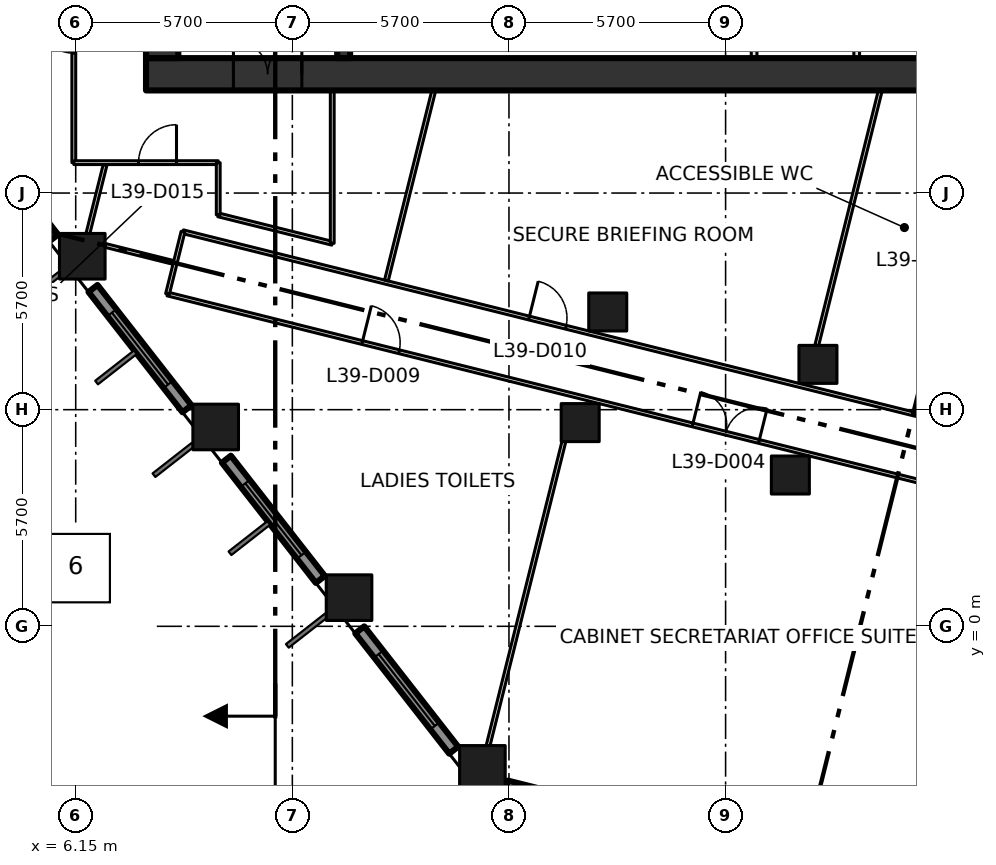
"""IFC4 building model, lengths in metres.
Left out: names, types, materials, properties, quantities, classifications, styles, units other than length and angle.
Written with IfcOpenShell. Run it as: python <this file> out.ifc"""

import sys

from ifc_helpers import new_model, si_unit, direction, frame, frame_2d, origin, origin_2d, place, context, subcontext, project, spatial, rectangle, extrude, element, fill, save


model = new_model("IFC4")
c1 = context("Model", 3, precision=1e-05, world=origin(), true_north=direction((0.0, 1.0)))
c2 = subcontext(c1, "Body", "Model", "MODEL_VIEW")
j1 = project(units=[si_unit("LENGTHUNIT", "METRE"), si_unit("PLANEANGLEUNIT", "RADIAN")], contexts=[c1])
p1 = place(None, origin())
s1 = spatial("IfcSite", under=j1, at=p1, CompositionType="ELEMENT")
p2 = place(p1, origin())
s2 = spatial("IfcBuilding", under=s1, at=p2, CompositionType="ELEMENT")
p3 = place(p2, frame((0.0, 0.0, 174.0)))
s3 = spatial("IfcBuildingStorey", under=s2, at=p3, CompositionType="ELEMENT", Elevation=174.0)
for number, where, z_axis, x_axis in (
    (1, (16.851, -3.738, 0.0), (0.0, 0.0, 1.0), (1.0, 0.0, 0.0)),
    (2, (13.342, 0.754, 0.0), (0.0, 0.0, 1.0), (1.0, 0.0, 0.0)),
    (3, (9.833, 5.245, 0.0), (0.0, 0.0, 1.0), (1.0, 0.0, 0.0)),
    (4, (6.323, 9.737, 0.0), (0.0, 0.0, 1.0), (1.0, 0.0, 0.0)),
):
    element("IfcColumn", number, at=place(p3, frame(where, z_axis=z_axis, x_axis=x_axis)), inside=s3, PredefinedType="COLUMN", context=c2, shape_type="SweptSolid", body=[
        extrude(rectangle(XDim=1.2, YDim=1.2, at=origin_2d()), origin(), (0.0, 0.0, 1.0), 4.2),
    ])
for number, where, z_axis, x_axis in (
    (5, (19.424, 5.36, 0.0), (0.0, 0.0, 1.0), (1.0, 0.0, 0.0)),
    (6, (24.954, 3.981, 0.0), (0.0, 0.0, 1.0), (1.0, 0.0, 0.0)),
    (7, (20.149, 8.271, 0.0), (0.0, 0.0, 1.0), (1.0, 0.0, 0.0)),
    (8, (25.68, 6.892, 0.0), (0.0, 0.0, 1.0), (1.0, 0.0, 0.0)),
):
    element("IfcColumn", number, at=place(p3, frame(where, z_axis=z_axis, x_axis=x_axis)), inside=s3, PredefinedType="COLUMN", context=c2, shape_type="SweptSolid", body=[
        extrude(rectangle(XDim=1.0, YDim=1.0, at=origin_2d()), origin(), (0.0, 0.0, 1.0), 4.2),
    ])
p4 = place(p3, frame((8.0, 14.525, -0.3), z_axis=(0.0, 0.0, 1.0), x_axis=(1.0, 0.0, 0.0)))
e9 = element("IfcWall", 9, at=p4, inside=s3, PredefinedType="SHEAR", context=c2, shape_type="SweptSolid", body=[
    extrude(rectangle(XDim=22.8, YDim=0.85, at=frame_2d((11.4, 0.0))), origin(), (0.0, 0.0, 1.0), 4.2),
])
p5 = place(p4, frame((2.3, 0.0, 0.3)))
e10 = element("IfcOpeningElement", 10, at=p5, cuts=e9, PredefinedType="OPENING", context=c2, shape_type="SweptSolid", body=[
    extrude(rectangle(XDim=1.8, YDim=2.1, at=frame_2d((0.9, 1.05))), frame((0.0, 0.435, 0.0), z_axis=(0.0, -1.0, 0.0), x_axis=(1.0, 0.0, 0.0)), (0.0, 0.0, 1.0), 0.87),
])
p6 = place(p3, frame((8.425, 14.95, -0.3), z_axis=(0.0, 0.0, 1.0), x_axis=(0.0, 1.0, 0.0)))
e11 = element("IfcWall", 11, at=p6, inside=s3, PredefinedType="SHEAR", context=c2, shape_type="SweptSolid", body=[
    extrude(rectangle(XDim=20.75, YDim=0.85, at=frame_2d((10.375, 0.0))), origin(), (0.0, 0.0, 1.0), 4.2),
])
p7 = place(p3, frame((13.2, 14.95, 0.0), z_axis=(0.0, 0.0, 1.0), x_axis=(0.0, 1.0, 0.0)))
e12 = element("IfcWall", 12, at=p7, inside=s3, PredefinedType="SHEAR", context=c2, shape_type="SweptSolid", body=[
    extrude(rectangle(XDim=20.75, YDim=0.34, at=frame_2d((10.375, 0.0))), origin(), (0.0, 0.0, 1.0), 3.9),
])
p8 = place(p7, frame((3.35, 0.0, 0.0)))
e13 = element("IfcOpeningElement", 13, at=p8, cuts=e12, PredefinedType="OPENING", context=c2, shape_type="SweptSolid", body=[
    extrude(rectangle(XDim=1.8, YDim=2.1, at=frame_2d((0.9, 1.05))), frame((0.0, 0.18, 0.0), z_axis=(0.0, -1.0, 0.0), x_axis=(1.0, 0.0, 0.0)), (0.0, 0.0, 1.0), 0.36),
])
p9 = place(p7, frame((11.45, 0.0, 0.0)))
e14 = element("IfcOpeningElement", 14, at=p9, cuts=e12, PredefinedType="OPENING", context=c2, shape_type="SweptSolid", body=[
    extrude(rectangle(XDim=1.2, YDim=2.1, at=frame_2d((0.6, 1.05))), frame((0.0, 0.18, 0.0), z_axis=(0.0, -1.0, 0.0), x_axis=(1.0, 0.0, 0.0)), (0.0, 0.0, 1.0), 0.36),
])
for number, where, z_axis, x_axis in (
    (15, (24.0, 14.95, 0.0), (0.0, 0.0, 1.0), (0.0, 1.0, 0.0)),
    (16, (26.7, 14.95, 0.0), (0.0, 0.0, 1.0), (0.0, 1.0, 0.0)),
):
    element("IfcWall", number, at=place(p3, frame(where, z_axis=z_axis, x_axis=x_axis)), inside=s3, PredefinedType="PARTITIONING", context=c2, shape_type="SweptSolid", body=[
        extrude(rectangle(XDim=2.675, YDim=0.15, at=frame_2d((1.337, 0.0))), origin(), (0.0, 0.0, 1.0), 3.9),
    ])
p10 = place(p3, frame((3.096, 13.381, 0.0), z_axis=(0.0, 0.0, 1.0), x_axis=(0.615563820493, -0.78808704018, 0.0)))
e17 = element("IfcWall", 17, at=p10, inside=s3, PredefinedType="SOLIDWALL", context=c2, shape_type="SweptSolid", body=[
    extrude(rectangle(XDim=4.016, YDim=0.3, at=frame_2d((2.008, 0.0))), origin(), (0.0, 0.0, 1.0), 3.15),
])
p11 = place(p10, frame((0.808, 0.0, 0.8)))
e18 = element("IfcOpeningElement", 18, at=p11, cuts=e17, PredefinedType="OPENING", context=c2, shape_type="SweptSolid", body=[
    extrude(rectangle(XDim=2.4, YDim=2.1, at=frame_2d((1.2, 1.05))), frame((0.0, 0.16, 0.0), z_axis=(0.0, -1.0, 0.0), x_axis=(1.0, 0.0, 0.0)), (0.0, 0.0, 1.0), 0.32),
])
p12 = place(p3, frame((6.605, 8.889, 0.0), z_axis=(0.0, 0.0, 1.0), x_axis=(0.615706559089, -0.787975528233, 0.0)))
e19 = element("IfcWall", 19, at=p12, inside=s3, PredefinedType="SOLIDWALL", context=c2, shape_type="SweptSolid", body=[
    extrude(rectangle(XDim=4.016, YDim=0.3, at=frame_2d((2.008, 0.0))), origin(), (0.0, 0.0, 1.0), 3.15),
])
p13 = place(p12, frame((0.808, 0.0, 0.8)))
e20 = element("IfcOpeningElement", 20, at=p13, cuts=e19, PredefinedType="OPENING", context=c2, shape_type="SweptSolid", body=[
    extrude(rectangle(XDim=2.4, YDim=2.1, at=frame_2d((1.2, 1.05))), frame((0.0, 0.16, 0.0), z_axis=(0.0, -1.0, 0.0), x_axis=(1.0, 0.0, 0.0)), (0.0, 0.0, 1.0), 0.32),
])
p14 = place(p3, frame((10.115, 4.397, 0.0), z_axis=(0.0, 0.0, 1.0), x_axis=(0.615644041972, -0.788024373725, 0.0)))
e21 = element("IfcWall", 21, at=p14, inside=s3, PredefinedType="SOLIDWALL", context=c2, shape_type="SweptSolid", body=[
    extrude(rectangle(XDim=4.015, YDim=0.3, at=frame_2d((2.008, 0.0))), origin(), (0.0, 0.0, 1.0), 3.15),
])
p15 = place(p14, frame((0.807, 0.0, 0.8)))
e22 = element("IfcOpeningElement", 22, at=p15, cuts=e21, PredefinedType="OPENING", context=c2, shape_type="SweptSolid", body=[
    extrude(rectangle(XDim=2.4, YDim=2.1, at=frame_2d((1.2, 1.05))), frame((0.0, 0.16, 0.0), z_axis=(0.0, -1.0, 0.0), x_axis=(1.0, 0.0, 0.0)), (0.0, 0.0, 1.0), 0.32),
])
p16 = place(p3, frame((13.624, -0.094, 0.0), z_axis=(0.0, 0.0, 1.0), x_axis=(0.615526062586, -0.7881165309, 0.0)))
e23 = element("IfcWall", 23, at=p16, inside=s3, PredefinedType="SOLIDWALL", context=c2, shape_type="SweptSolid", body=[
    extrude(rectangle(XDim=4.016, YDim=0.3, at=frame_2d((2.008, 0.0))), origin(), (0.0, 0.0, 1.0), 3.15),
])
p17 = place(p16, frame((0.808, 0.0, 0.8)))
e24 = element("IfcOpeningElement", 24, at=p17, cuts=e23, PredefinedType="OPENING", context=c2, shape_type="SweptSolid", body=[
    extrude(rectangle(XDim=2.4, YDim=2.1, at=frame_2d((1.2, 1.05))), frame((0.0, 0.16, 0.0), z_axis=(0.0, -1.0, 0.0), x_axis=(1.0, 0.0, 0.0)), (0.0, 0.0, 1.0), 0.32),
])
p18 = place(p3, frame((17.484, -4.205, 0.0), z_axis=(0.0, 0.0, 1.0), x_axis=(0.970318118028, -0.241832069473, 0.0)))
e25 = element("IfcWall", 25, at=p18, inside=s3, PredefinedType="SOLIDWALL", context=c2, shape_type="SweptSolid", body=[
    extrude(rectangle(XDim=4.246, YDim=0.3, at=frame_2d((2.123, 0.0))), origin(), (0.0, 0.0, 1.0), 3.15),
])
p19 = place(p18, frame((0.923, 0.0, 0.8)))
e26 = element("IfcOpeningElement", 26, at=p19, cuts=e25, PredefinedType="OPENING", context=c2, shape_type="SweptSolid", body=[
    extrude(rectangle(XDim=2.4, YDim=2.1, at=frame_2d((1.2, 1.05))), frame((0.0, 0.16, 0.0), z_axis=(0.0, -1.0, 0.0), x_axis=(1.0, 0.0, 0.0)), (0.0, 0.0, 1.0), 0.32),
])
p20 = place(p3, frame((6.1, 12.2, 0.0), z_axis=(0.0, 0.0, 1.0), x_axis=(0.0, 1.0, 0.0)))
e27 = element("IfcWall", 27, at=p20, inside=s3, PredefinedType="PARTITIONING", context=c2, shape_type="SweptSolid", body=[
    extrude(rectangle(XDim=26.7, YDim=0.1, at=frame_2d((13.35, 0.0))), origin(), (0.0, 0.0, 1.0), 3.9),
])
p21 = place(p20, frame((2.88, 0.0, 0.0)))
e28 = element("IfcOpeningElement", 28, at=p21, cuts=e27, PredefinedType="OPENING", context=c2, shape_type="SweptSolid", body=[
    extrude(rectangle(XDim=1.0, YDim=2.1, at=frame_2d((0.5, 1.05))), frame((0.0, 0.06, 0.0), z_axis=(0.0, -1.0, 0.0), x_axis=(1.0, 0.0, 0.0)), (0.0, 0.0, 1.0), 0.12),
])
p22 = place(p20, frame((11.578, 0.0, 0.0)))
e29 = element("IfcOpeningElement", 29, at=p22, cuts=e27, PredefinedType="OPENING", context=c2, shape_type="SweptSolid", body=[
    extrude(rectangle(XDim=1.0, YDim=2.1, at=frame_2d((0.5, 1.05))), frame((0.0, 0.06, 0.0), z_axis=(0.0, -1.0, 0.0), x_axis=(1.0, 0.0, 0.0)), (0.0, 0.0, 1.0), 0.12),
])
p23 = place(p3, frame((6.1, 12.2, 0.0), z_axis=(0.0, 0.0, 1.0), x_axis=(1.0, 0.0, 0.0)))
e30 = element("IfcWall", 30, at=p23, inside=s3, PredefinedType="PARTITIONING", context=c2, shape_type="SweptSolid", body=[
    extrude(rectangle(XDim=3.8, YDim=0.1, at=frame_2d((1.9, 0.0))), origin(), (0.0, 0.0, 1.0), 3.9),
])
p24 = place(p23, frame((1.702, 0.0, 0.0)))
e31 = element("IfcOpeningElement", 31, at=p24, cuts=e30, PredefinedType="OPENING", context=c2, shape_type="SweptSolid", body=[
    extrude(rectangle(XDim=1.0, YDim=2.1, at=frame_2d((0.5, 1.05))), frame((0.0, 0.06, 0.0), z_axis=(0.0, -1.0, 0.0), x_axis=(1.0, 0.0, 0.0)), (0.0, 0.0, 1.0), 0.12),
])
p25 = place(p3, frame((8.565, 8.744, 0.0), z_axis=(0.0, 0.0, 1.0), x_axis=(0.97029693432, -0.24191705035, 0.0)))
e32 = element("IfcWall", 32, at=p25, inside=s3, PredefinedType="PARTITIONING", context=c2, shape_type="SweptSolid", body=[
    extrude(rectangle(XDim=56.375, YDim=0.1, at=frame_2d((28.187, 0.0))), origin(), (0.0, 0.0, 1.0), 3.9),
])
p26 = place(p25, frame((42.739, 0.0, 0.0)))
e33 = element("IfcOpeningElement", 33, at=p26, cuts=e32, PredefinedType="OPENING", context=c2, shape_type="SweptSolid", body=[
    extrude(rectangle(XDim=1.8, YDim=2.1, at=frame_2d((0.9, 1.05))), frame((0.0, 0.06, 0.0), z_axis=(0.0, -1.0, 0.0), x_axis=(1.0, 0.0, 0.0)), (0.0, 0.0, 1.0), 0.12),
])
p27 = place(p25, frame((14.239, 0.0, 0.0)))
e34 = element("IfcOpeningElement", 34, at=p27, cuts=e32, PredefinedType="OPENING", context=c2, shape_type="SweptSolid", body=[
    extrude(rectangle(XDim=1.8, YDim=2.1, at=frame_2d((0.9, 1.05))), frame((0.0, 0.06, 0.0), z_axis=(0.0, -1.0, 0.0), x_axis=(1.0, 0.0, 0.0)), (0.0, 0.0, 1.0), 0.12),
])
p28 = place(p25, frame((29.74, 0.0, 0.0)))
e35 = element("IfcOpeningElement", 35, at=p28, cuts=e32, PredefinedType="OPENING", context=c2, shape_type="SweptSolid", body=[
    extrude(rectangle(XDim=1.8, YDim=2.1, at=frame_2d((0.9, 1.05))), frame((0.0, 0.06, 0.0), z_axis=(0.0, -1.0, 0.0), x_axis=(1.0, 0.0, 0.0)), (0.0, 0.0, 1.0), 0.12),
])
p29 = place(p25, frame((35.64, 0.0, 0.0)))
e36 = element("IfcOpeningElement", 36, at=p29, cuts=e32, PredefinedType="OPENING", context=c2, shape_type="SweptSolid", body=[
    extrude(rectangle(XDim=1.0, YDim=2.1, at=frame_2d((0.5, 1.05))), frame((0.0, 0.06, 0.0), z_axis=(0.0, -1.0, 0.0), x_axis=(1.0, 0.0, 0.0)), (0.0, 0.0, 1.0), 0.12),
])
p30 = place(p25, frame((5.28, 0.0, 0.0)))
e37 = element("IfcOpeningElement", 37, at=p30, cuts=e32, PredefinedType="OPENING", context=c2, shape_type="SweptSolid", body=[
    extrude(rectangle(XDim=1.0, YDim=2.1, at=frame_2d((0.5, 1.05))), frame((0.0, 0.06, 0.0), z_axis=(0.0, -1.0, 0.0), x_axis=(1.0, 0.0, 0.0)), (0.0, 0.0, 1.0), 0.12),
])
p31 = place(p3, frame((8.973, 10.382, 0.0), z_axis=(0.0, 0.0, 1.0), x_axis=(0.970286808807, -0.241957658808, 0.0)))
e38 = element("IfcWall", 38, at=p31, inside=s3, PredefinedType="PARTITIONING", context=c2, shape_type="SweptSolid", body=[
    extrude(rectangle(XDim=19.88, YDim=0.1, at=frame_2d((9.94, 0.0))), origin(), (0.0, 0.0, 1.0), 3.9),
])
p32 = place(p31, frame((9.384, 0.0, 0.0)))
e39 = element("IfcOpeningElement", 39, at=p32, cuts=e38, PredefinedType="OPENING", context=c2, shape_type="SweptSolid", body=[
    extrude(rectangle(XDim=1.0, YDim=2.1, at=frame_2d((0.5, 1.05))), frame((0.0, 0.06, 0.0), z_axis=(0.0, -1.0, 0.0), x_axis=(1.0, 0.0, 0.0)), (0.0, 0.0, 1.0), 0.12),
])
p33 = place(p3, frame((8.973, 10.382, 0.0), z_axis=(0.0, 0.0, 1.0), x_axis=(-0.241650823739, -0.970363271866, 0.0)))
e40 = element("IfcWall", 40, at=p33, inside=s3, PredefinedType="PARTITIONING", context=c2, shape_type="SweptSolid", body=[
    extrude(rectangle(XDim=1.688, YDim=0.1, at=frame_2d((0.844, 0.0))), origin(), (0.0, 0.0, 1.0), 3.9),
])
p34 = place(p3, frame((9.9, 10.826, 0.0), z_axis=(0.0, 0.0, 1.0), x_axis=(0.970290953223, -0.241941038466, 0.0)))
e41 = element("IfcWall", 41, at=p34, inside=s3, PredefinedType="PARTITIONING", context=c2, shape_type="SweptSolid", body=[
    extrude(rectangle(XDim=3.092, YDim=0.1, at=frame_2d((1.546, 0.0))), origin(), (0.0, 0.0, 1.0), 3.9),
])
p35 = place(p3, frame((9.9, 12.2, 0.0), z_axis=(0.0, 0.0, 1.0), x_axis=(0.0, -1.0, 0.0)))
e42 = element("IfcWall", 42, at=p35, inside=s3, PredefinedType="PARTITIONING", context=c2, shape_type="SweptSolid", body=[
    extrude(rectangle(XDim=1.374, YDim=0.1, at=frame_2d((0.687, 0.0))), origin(), (0.0, 0.0, 1.0), 3.9),
])
p36 = place(p3, frame((12.9, 10.078, 0.0), z_axis=(0.0, 0.0, 1.0), x_axis=(0.0, 1.0, 0.0)))
e43 = element("IfcWall", 43, at=p36, inside=s3, PredefinedType="PARTITIONING", context=c2, shape_type="SweptSolid", body=[
    extrude(rectangle(XDim=4.022, YDim=0.1, at=frame_2d((2.011, 0.0))), origin(), (0.0, 0.0, 1.0), 3.9),
])
p37 = place(p3, frame((30.259, 13.583, 0.0), z_axis=(0.0, 0.0, 1.0), x_axis=(-0.241888494143, -0.970304053584, 0.0)))
e44 = element("IfcWall", 44, at=p37, inside=s3, PredefinedType="PARTITIONING", context=c2, shape_type="SweptSolid", body=[
    extrude(rectangle(XDim=8.256, YDim=0.1, at=frame_2d((4.128, 0.0))), origin(), (0.0, 0.0, 1.0), 3.9),
])
p38 = place(p37, frame((3.78, 0.0, 0.0)))
e45 = element("IfcOpeningElement", 45, at=p38, cuts=e44, PredefinedType="OPENING", context=c2, shape_type="SweptSolid", body=[
    extrude(rectangle(XDim=1.0, YDim=2.1, at=frame_2d((0.5, 1.05))), frame((0.0, 0.06, 0.0), z_axis=(0.0, -1.0, 0.0), x_axis=(1.0, 0.0, 0.0)), (0.0, 0.0, 1.0), 0.12),
])
p39 = place(p3, frame((6.922, 12.138, 0.0), z_axis=(0.0, 0.0, 1.0), x_axis=(-0.242504681353, -0.970150235542, 0.0)))
e46 = element("IfcWall", 46, at=p39, inside=s3, PredefinedType="PARTITIONING", context=c2, shape_type="SweptSolid", body=[
    extrude(rectangle(XDim=1.856, YDim=0.1, at=frame_2d((0.928, 0.0))), origin(), (0.0, 0.0, 1.0), 3.9),
])
p40 = place(p3, frame((8.72, 9.574, 0.0), z_axis=(0.0, 0.0, 1.0), x_axis=(-0.97017350799, 0.242411559945, 0.0)))
e47 = element("IfcWall", 47, at=p40, inside=s3, PredefinedType="PARTITIONING", context=c2, shape_type="SweptSolid", body=[
    extrude(rectangle(XDim=1.852, YDim=0.1, at=frame_2d((0.926, 0.0))), origin(), (0.0, 0.0, 1.0), 3.9),
])
p41 = place(p3, frame((14.325, 9.099, 0.0), z_axis=(0.0, 0.0, 1.0), x_axis=(0.241956019685, 0.970287217548, 0.0)))
e48 = element("IfcWall", 48, at=p41, inside=s3, PredefinedType="PARTITIONING", context=c2, shape_type="SweptSolid", body=[
    extrude(rectangle(XDim=5.154, YDim=0.1, at=frame_2d((2.577, 0.0))), origin(), (0.0, 0.0, 1.0), 3.9),
])
p42 = place(p3, frame((17.001, -3.138, 0.0), z_axis=(0.0, 0.0, 1.0), x_axis=(0.241922303467, 0.970295624583, 0.0)))
e49 = element("IfcWall", 49, at=p42, inside=s3, PredefinedType="PARTITIONING", context=c2, shape_type="SweptSolid", body=[
    extrude(rectangle(XDim=8.243, YDim=0.1, at=frame_2d((4.122, 0.0))), origin(), (0.0, 0.0, 1.0), 3.9),
])
p43 = place(p3, frame((25.649, 7.392, 0.0), z_axis=(0.0, 0.0, 1.0), x_axis=(0.241870819599, 0.970308459525, 0.0)))
e50 = element("IfcWall", 50, at=p43, inside=s3, PredefinedType="PARTITIONING", context=c2, shape_type="SweptSolid", body=[
    extrude(rectangle(XDim=6.913, YDim=0.1, at=frame_2d((3.457, 0.0))), origin(), (0.0, 0.0, 1.0), 3.9),
])
p44 = place(p3, frame((28.063, -5.896, 0.0), z_axis=(0.0, 0.0, 1.0), x_axis=(0.241894418317, 0.970302576719, 0.0)))
e51 = element("IfcWall", 51, at=p44, inside=s3, PredefinedType="PARTITIONING", context=c2, shape_type="SweptSolid", body=[
    extrude(rectangle(XDim=8.243, YDim=0.1, at=frame_2d((4.122, 0.0))), origin(), (0.0, 0.0, 1.0), 3.9),
])
p45 = place(p5, origin())
e52 = element("IfcDoor", 52, at=p45, inside=s3, OperationType="DOUBLE_DOOR_SINGLE_SWING", PredefinedType="DOOR", context=c2, shape_type="SweptSolid", body=[
    extrude(rectangle(XDim=1.8, YDim=2.1, at=frame_2d((0.9, 1.05))), frame((0.0, 0.025, 0.0), z_axis=(0.0, -1.0, 0.0), x_axis=(1.0, 0.0, 0.0)), (0.0, 0.0, 1.0), 0.05),
])
fill(e10, e52)
p46 = place(p13, origin())
e53 = element("IfcWindow", 53, at=p46, inside=s3, PartitioningType="DOUBLE_PANEL_VERTICAL", PredefinedType="WINDOW", context=c2, shape_type="SweptSolid", body=[
    extrude(rectangle(XDim=2.4, YDim=2.1, at=frame_2d((1.2, 1.05))), frame((0.0, 0.03, 0.0), z_axis=(0.0, -1.0, 0.0), x_axis=(1.0, 0.0, 0.0)), (0.0, 0.0, 1.0), 0.06),
])
fill(e20, e53)
p47 = place(p15, origin())
e54 = element("IfcWindow", 54, at=p47, inside=s3, PartitioningType="DOUBLE_PANEL_VERTICAL", PredefinedType="WINDOW", context=c2, shape_type="SweptSolid", body=[
    extrude(rectangle(XDim=2.4, YDim=2.1, at=frame_2d((1.2, 1.05))), frame((0.0, 0.03, 0.0), z_axis=(0.0, -1.0, 0.0), x_axis=(1.0, 0.0, 0.0)), (0.0, 0.0, 1.0), 0.06),
])
fill(e22, e54)
p48 = place(p17, origin())
e55 = element("IfcWindow", 55, at=p48, inside=s3, PartitioningType="DOUBLE_PANEL_VERTICAL", PredefinedType="WINDOW", context=c2, shape_type="SweptSolid", body=[
    extrude(rectangle(XDim=2.4, YDim=2.1, at=frame_2d((1.2, 1.05))), frame((0.0, 0.03, 0.0), z_axis=(0.0, -1.0, 0.0), x_axis=(1.0, 0.0, 0.0)), (0.0, 0.0, 1.0), 0.06),
])
fill(e24, e55)
p49 = place(p27, origin())
e56 = element("IfcDoor", 56, at=p49, inside=s3, OperationType="DOUBLE_DOOR_SINGLE_SWING", PredefinedType="DOOR", context=c2, shape_type="SweptSolid", body=[
    extrude(rectangle(XDim=1.8, YDim=2.1, at=frame_2d((0.9, 1.05))), frame((0.0, 0.025, 0.0), z_axis=(0.0, -1.0, 0.0), x_axis=(1.0, 0.0, 0.0)), (0.0, 0.0, 1.0), 0.05),
])
fill(e34, e56)
p50 = place(p30, origin())
e57 = element("IfcDoor", 57, at=p50, inside=s3, OperationType="SINGLE_SWING_LEFT", PredefinedType="DOOR", context=c2, shape_type="SweptSolid", body=[
    extrude(rectangle(XDim=1.0, YDim=2.1, at=frame_2d((0.5, 1.05))), frame((0.0, 0.025, 0.0), z_axis=(0.0, -1.0, 0.0), x_axis=(1.0, 0.0, 0.0)), (0.0, 0.0, 1.0), 0.05),
])
fill(e37, e57)
p51 = place(p32, origin())
e58 = element("IfcDoor", 58, at=p51, inside=s3, OperationType="SINGLE_SWING_LEFT", PredefinedType="DOOR", context=c2, shape_type="SweptSolid", body=[
    extrude(rectangle(XDim=1.0, YDim=2.1, at=frame_2d((0.5, 1.05))), frame((0.0, 0.025, 0.0), z_axis=(0.0, -1.0, 0.0), x_axis=(1.0, 0.0, 0.0)), (0.0, 0.0, 1.0), 0.05),
])
fill(e39, e58)
p52 = place(p21, origin())
e59 = element("IfcDoor", 59, at=p52, inside=s3, OperationType="SINGLE_SWING_RIGHT", PredefinedType="DOOR", context=c2, shape_type="SweptSolid", body=[
    extrude(rectangle(XDim=1.0, YDim=2.1, at=frame_2d((0.5, 1.05))), frame((0.0, 0.025, 0.0), z_axis=(0.0, -1.0, 0.0), x_axis=(1.0, 0.0, 0.0)), (0.0, 0.0, 1.0), 0.05),
])
fill(e28, e59)
p53 = place(p24, origin())
e60 = element("IfcDoor", 60, at=p53, inside=s3, OperationType="SINGLE_SWING_RIGHT", PredefinedType="DOOR", context=c2, shape_type="SweptSolid", body=[
    extrude(rectangle(XDim=1.0, YDim=2.1, at=frame_2d((0.5, 1.05))), frame((0.0, 0.025, 0.0), z_axis=(0.0, -1.0, 0.0), x_axis=(1.0, 0.0, 0.0)), (0.0, 0.0, 1.0), 0.05),
])
fill(e31, e60)
save(model, sys.argv[1])
